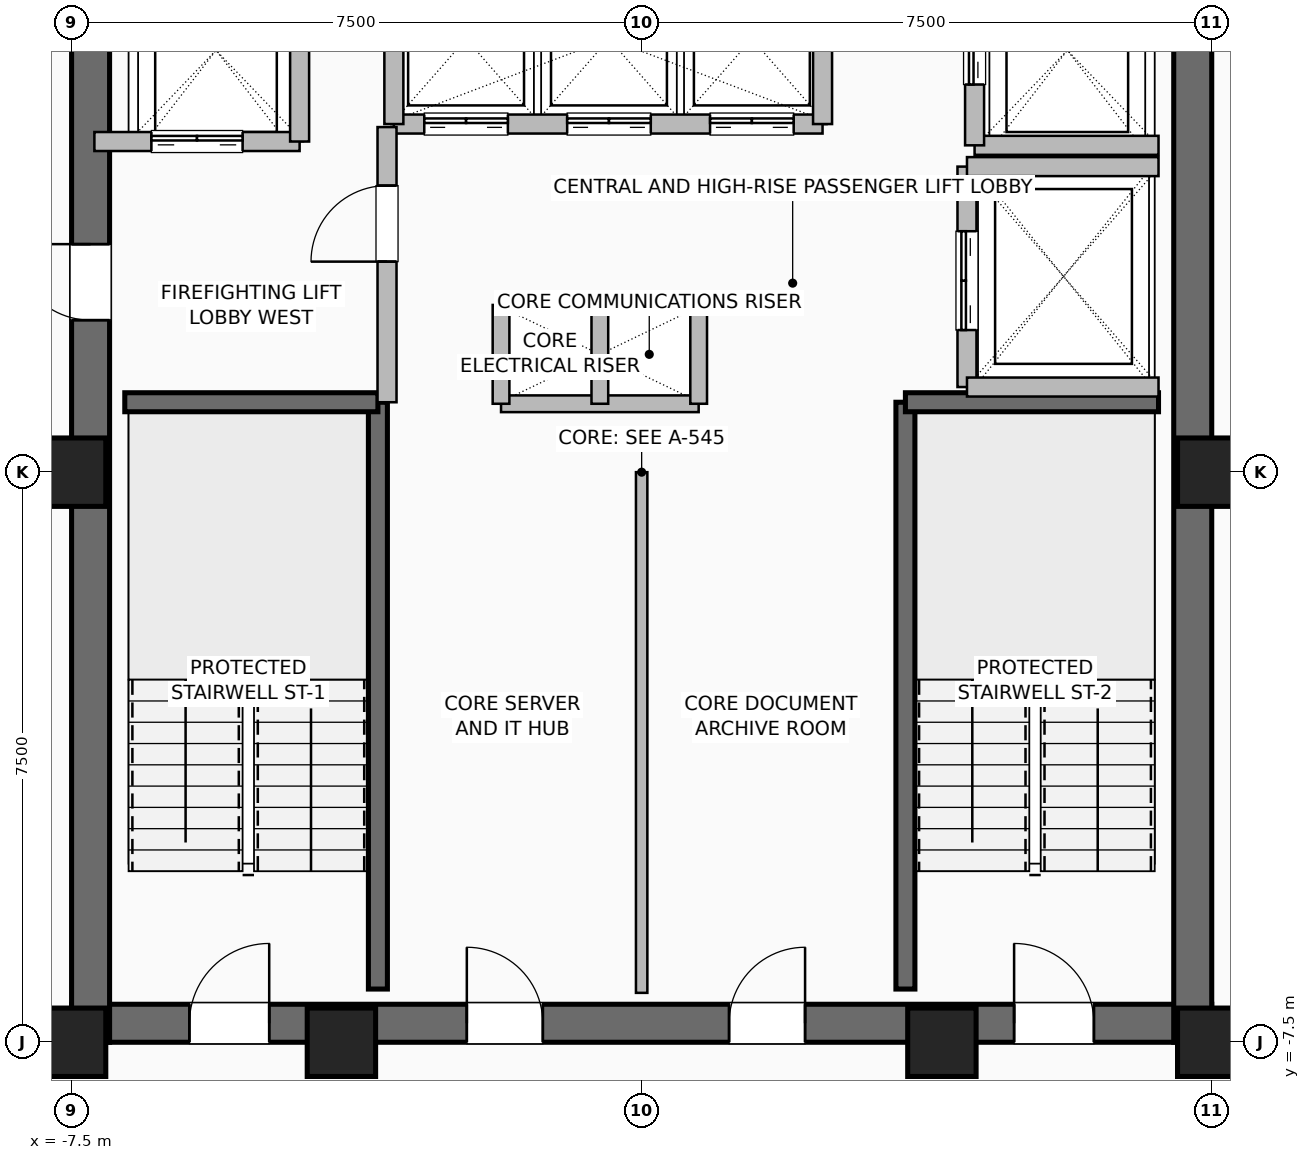
"""IFC4 building model, lengths in metres.
Left out: names, types, materials, properties, quantities, classifications, styles, units other than length and angle.
Written with IfcOpenShell. Run it as: python <this file> out.ifc"""

import sys

from ifc_helpers import new_model, si_unit, direction, frame, frame_2d, origin, origin_2d, place, context, subcontext, project, spatial, rectangle, hollow_rectangle, extrude, element, fill, save


model = new_model("IFC4")
c1 = context("Model", 3, precision=1e-05, world=origin(), true_north=direction((0.0, 1.0)))
c2 = subcontext(c1, "Body", "Model", "MODEL_VIEW")
j1 = project(units=[si_unit("LENGTHUNIT", "METRE"), si_unit("PLANEANGLEUNIT", "RADIAN")], contexts=[c1])
p1 = place(None, origin())
s1 = spatial("IfcSite", under=j1, at=p1, CompositionType="ELEMENT")
p2 = place(p1, origin())
s2 = spatial("IfcBuilding", under=s1, at=p2, CompositionType="ELEMENT")
p3 = place(p2, frame((0.0, 0.0, 173.4)))
s3 = spatial("IfcBuildingStorey", under=s2, at=p3, CompositionType="ELEMENT", Elevation=173.4)
for number, where, z_axis, x_axis in (
    (1, (-7.5, -7.5, 0.0), (0.0, 0.0, 1.0), (1.0, 0.0, 0.0)),
    (2, (-3.95, -7.5, 0.0), (0.0, 0.0, 1.0), (1.0, 0.0, 0.0)),
    (3, (3.95, -7.5, 0.0), (0.0, 0.0, 1.0), (1.0, 0.0, 0.0)),
    (4, (7.5, -7.5, 0.0), (0.0, 0.0, 1.0), (1.0, 0.0, 0.0)),
    (5, (7.5, 0.0, 0.0), (0.0, 0.0, 1.0), (1.0, 0.0, 0.0)),
    (6, (-7.5, 0.0, 0.0), (0.0, 0.0, 1.0), (1.0, 0.0, 0.0)),
):
    element("IfcColumn", number, at=place(p3, frame(where, z_axis=z_axis, x_axis=x_axis)), inside=s3, PredefinedType="COLUMN", context=c2, shape_type="SweptSolid", body=[
        extrude(hollow_rectangle(XDim=0.9, YDim=0.9, WallThickness=0.045, at=origin_2d()), origin(), (0.0, 0.0, 1.0), 3.6),
    ])
p4 = place(p3, frame((-7.5, -7.25, 0.0), z_axis=(0.0, 0.0, 1.0), x_axis=(1.0, 0.0, 0.0)))
e7 = element("IfcWall", 7, at=p4, inside=s3, PredefinedType="SHEAR", context=c2, shape_type="SweptSolid", body=[
    extrude(rectangle(XDim=15.0, YDim=0.5, at=frame_2d((7.5, 0.0))), origin(), (0.0, 0.0, 1.0), 3.36),
])
p5 = place(p4, frame((1.55, 0.0, 0.0)))
e8 = element("IfcOpeningElement", 8, at=p5, cuts=e7, PredefinedType="OPENING", context=c2, shape_type="SweptSolid", body=[
    extrude(rectangle(XDim=1.05, YDim=2.08, at=frame_2d((0.525, 1.04))), frame((0.0, 0.26, 0.0), z_axis=(0.0, -1.0, 0.0), x_axis=(1.0, 0.0, 0.0)), (0.0, 0.0, 1.0), 0.52),
])
p6 = place(p4, frame((12.4, 0.0, 0.0)))
e9 = element("IfcOpeningElement", 9, at=p6, cuts=e7, PredefinedType="OPENING", context=c2, shape_type="SweptSolid", body=[
    extrude(rectangle(XDim=1.05, YDim=2.08, at=frame_2d((0.525, 1.04))), frame((0.0, 0.26, 0.0), z_axis=(0.0, -1.0, 0.0), x_axis=(1.0, 0.0, 0.0)), (0.0, 0.0, 1.0), 0.52),
])
p7 = place(p4, frame((5.2, 0.0, 0.0)))
e10 = element("IfcOpeningElement", 10, at=p7, cuts=e7, PredefinedType="OPENING", context=c2, shape_type="SweptSolid", body=[
    extrude(rectangle(XDim=1.0, YDim=2.08, at=frame_2d((0.5, 1.04))), frame((0.0, 0.26, 0.0), z_axis=(0.0, -1.0, 0.0), x_axis=(1.0, 0.0, 0.0)), (0.0, 0.0, 1.0), 0.52),
])
p8 = place(p4, frame((8.65, 0.0, 0.0)))
e11 = element("IfcOpeningElement", 11, at=p8, cuts=e7, PredefinedType="OPENING", context=c2, shape_type="SweptSolid", body=[
    extrude(rectangle(XDim=1.0, YDim=2.08, at=frame_2d((0.5, 1.04))), frame((0.0, 0.26, 0.0), z_axis=(0.0, -1.0, 0.0), x_axis=(1.0, 0.0, 0.0)), (0.0, 0.0, 1.0), 0.52),
])
p9 = place(p3, frame((-7.25, -7.5, 0.0), z_axis=(0.0, 0.0, 1.0), x_axis=(0.0, 1.0, 0.0)))
e12 = element("IfcWall", 12, at=p9, inside=s3, PredefinedType="SHEAR", context=c2, shape_type="SweptSolid", body=[
    extrude(rectangle(XDim=15.0, YDim=0.5, at=frame_2d((7.5, 0.0))), origin(), (0.0, 0.0, 1.0), 3.36),
])
p10 = place(p9, frame((9.5, 0.0, 0.0)))
e13 = element("IfcOpeningElement", 13, at=p10, cuts=e12, PredefinedType="OPENING", context=c2, shape_type="SweptSolid", body=[
    extrude(rectangle(XDim=1.0, YDim=2.08, at=frame_2d((0.5, 1.04))), frame((0.0, 0.26, 0.0), z_axis=(0.0, -1.0, 0.0), x_axis=(1.0, 0.0, 0.0)), (0.0, 0.0, 1.0), 0.52),
])
p11 = place(p3, frame((7.25, -7.5, 0.0), z_axis=(0.0, 0.0, 1.0), x_axis=(0.0, 1.0, 0.0)))
e14 = element("IfcWall", 14, at=p11, inside=s3, PredefinedType="SHEAR", context=c2, shape_type="SweptSolid", body=[
    extrude(rectangle(XDim=15.0, YDim=0.5, at=frame_2d((7.5, 0.0))), origin(), (0.0, 0.0, 1.0), 3.36),
])
p12 = place(p3, frame((-3.47, -6.8, 0.0), z_axis=(0.0, 0.0, 1.0), x_axis=(0.0, 1.0, 0.0)))
e15 = element("IfcWall", 15, at=p12, inside=s3, PredefinedType="SHEAR", context=c2, shape_type="SweptSolid", body=[
    extrude(rectangle(XDim=7.72, YDim=0.25, at=frame_2d((3.86, 0.0))), origin(), (0.0, 0.0, 1.0), 3.36),
])
p13 = place(p3, frame((-6.8, 0.92, 0.0), z_axis=(0.0, 0.0, 1.0), x_axis=(1.0, 0.0, 0.0)))
e16 = element("IfcWall", 16, at=p13, inside=s3, PredefinedType="SHEAR", context=c2, shape_type="SweptSolid", body=[
    extrude(rectangle(XDim=3.33, YDim=0.25, at=frame_2d((1.665, 0.0))), origin(), (0.0, 0.0, 1.0), 3.36),
])
p14 = place(p3, frame((3.47, -6.8, 0.0), z_axis=(0.0, 0.0, 1.0), x_axis=(0.0, 1.0, 0.0)))
e17 = element("IfcWall", 17, at=p14, inside=s3, PredefinedType="SHEAR", context=c2, shape_type="SweptSolid", body=[
    extrude(rectangle(XDim=7.72, YDim=0.25, at=frame_2d((3.86, 0.0))), origin(), (0.0, 0.0, 1.0), 3.36),
])
p15 = place(p3, frame((3.47, 0.92, 0.0), z_axis=(0.0, 0.0, 1.0), x_axis=(1.0, 0.0, 0.0)))
e18 = element("IfcWall", 18, at=p15, inside=s3, PredefinedType="SHEAR", context=c2, shape_type="SweptSolid", body=[
    extrude(rectangle(XDim=3.33, YDim=0.25, at=frame_2d((1.665, 0.0))), origin(), (0.0, 0.0, 1.0), 3.36),
])
for number, where, z_axis, x_axis in (
    (19, (-1.85, 2.2, 0.0), (0.0, 0.0, 1.0), (1.0, 0.0, 0.0)),
    (20, (-1.85, 0.9, 0.0), (0.0, 0.0, 1.0), (1.0, 0.0, 0.0)),
):
    element("IfcWall", number, at=place(p3, frame(where, z_axis=z_axis, x_axis=x_axis)), inside=s3, PredefinedType="PARTITIONING", context=c2, shape_type="SweptSolid", body=[
        extrude(rectangle(XDim=2.6, YDim=0.22, at=frame_2d((1.3, 0.0))), origin(), (0.0, 0.0, 1.0), 3.36),
    ])
for number, where, z_axis, x_axis in (
    (21, (-0.55, 0.9, 0.0), (0.0, 0.0, 1.0), (0.0, 1.0, 0.0)),
    (22, (0.75, 0.9, 0.0), (0.0, 0.0, 1.0), (0.0, 1.0, 0.0)),
    (23, (-1.85, 0.9, 0.0), (0.0, 0.0, 1.0), (0.0, 1.0, 0.0)),
):
    element("IfcWall", number, at=place(p3, frame(where, z_axis=z_axis, x_axis=x_axis)), inside=s3, PredefinedType="PARTITIONING", context=c2, shape_type="SweptSolid", body=[
        extrude(rectangle(XDim=1.3, YDim=0.22, at=frame_2d((0.65, 0.0))), origin(), (0.0, 0.0, 1.0), 3.36),
    ])
p16 = place(p3, frame((-3.26, 4.58, 0.0), z_axis=(0.0, 0.0, 1.0), x_axis=(1.0, 0.0, 0.0)))
e24 = element("IfcWall", 24, at=p16, inside=s3, PredefinedType="SHEAR", context=c2, shape_type="SweptSolid", body=[
    extrude(rectangle(XDim=5.64, YDim=0.25, at=frame_2d((2.82, 0.0))), origin(), (0.0, 0.0, 1.0), 3.36),
])
p17 = place(p16, frame((0.4, 0.0, 0.0)))
e25 = element("IfcOpeningElement", 25, at=p17, cuts=e24, PredefinedType="OPENING", context=c2, shape_type="SweptSolid", body=[
    extrude(rectangle(XDim=1.1, YDim=2.2, at=frame_2d((0.55, 1.1))), frame((0.0, 0.135, 0.0), z_axis=(0.0, -1.0, 0.0), x_axis=(1.0, 0.0, 0.0)), (0.0, 0.0, 1.0), 0.27),
])
p18 = place(p16, frame((2.28, 0.0, 0.0)))
e26 = element("IfcOpeningElement", 26, at=p18, cuts=e24, PredefinedType="OPENING", context=c2, shape_type="SweptSolid", body=[
    extrude(rectangle(XDim=1.1, YDim=2.2, at=frame_2d((0.55, 1.1))), frame((0.0, 0.135, 0.0), z_axis=(0.0, -1.0, 0.0), x_axis=(1.0, 0.0, 0.0)), (0.0, 0.0, 1.0), 0.27),
])
p19 = place(p16, frame((4.16, 0.0, 0.0)))
e27 = element("IfcOpeningElement", 27, at=p19, cuts=e24, PredefinedType="OPENING", context=c2, shape_type="SweptSolid", body=[
    extrude(rectangle(XDim=1.1, YDim=2.2, at=frame_2d((0.55, 1.1))), frame((0.0, 0.135, 0.0), z_axis=(0.0, -1.0, 0.0), x_axis=(1.0, 0.0, 0.0)), (0.0, 0.0, 1.0), 0.27),
])
for number, where, z_axis, x_axis in (
    (28, (-3.26, 4.58, 0.0), (0.0, 0.0, 1.0), (0.0, 1.0, 0.0)),
    (29, (2.38, 4.58, 0.0), (0.0, 0.0, 1.0), (0.0, 1.0, 0.0)),
):
    element("IfcWall", number, at=place(p3, frame(where, z_axis=z_axis, x_axis=x_axis)), inside=s3, PredefinedType="SHEAR", context=c2, shape_type="SweptSolid", body=[
        extrude(rectangle(XDim=2.22, YDim=0.25, at=frame_2d((1.11, 0.0))), origin(), (0.0, 0.0, 1.0), 3.36),
    ])
p20 = place(p3, frame((-7.2, 4.35, 0.0), z_axis=(0.0, 0.0, 1.0), x_axis=(1.0, 0.0, 0.0)))
e30 = element("IfcWall", 30, at=p20, inside=s3, PredefinedType="SHEAR", context=c2, shape_type="SweptSolid", body=[
    extrude(rectangle(XDim=2.7, YDim=0.25, at=frame_2d((1.35, 0.0))), origin(), (0.0, 0.0, 1.0), 3.36),
])
p21 = place(p20, frame((0.75, 0.0, 0.0)))
e31 = element("IfcOpeningElement", 31, at=p21, cuts=e30, PredefinedType="OPENING", context=c2, shape_type="SweptSolid", body=[
    extrude(rectangle(XDim=1.2, YDim=2.2, at=frame_2d((0.6, 1.1))), frame((0.0, 0.135, 0.0), z_axis=(0.0, -1.0, 0.0), x_axis=(1.0, 0.0, 0.0)), (0.0, 0.0, 1.0), 0.27),
])
p22 = place(p3, frame((-4.5, 4.35, 0.0), z_axis=(0.0, 0.0, 1.0), x_axis=(0.0, 1.0, 0.0)))
e32 = element("IfcWall", 32, at=p22, inside=s3, PredefinedType="SHEAR", context=c2, shape_type="SweptSolid", body=[
    extrude(rectangle(XDim=2.85, YDim=0.25, at=frame_2d((1.425, 0.0))), origin(), (0.0, 0.0, 1.0), 3.36),
])
p23 = place(p3, frame((4.38, 4.3, 0.0), z_axis=(0.0, 0.0, 1.0), x_axis=(1.0, 0.0, 0.0)))
e33 = element("IfcWall", 33, at=p23, inside=s3, PredefinedType="SHEAR", context=c2, shape_type="SweptSolid", body=[
    extrude(rectangle(XDim=2.42, YDim=0.25, at=frame_2d((1.21, 0.0))), origin(), (0.0, 0.0, 1.0), 3.36),
])
p24 = place(p3, frame((4.38, 4.3, 0.0), z_axis=(0.0, 0.0, 1.0), x_axis=(0.0, 1.0, 0.0)))
e34 = element("IfcWall", 34, at=p24, inside=s3, PredefinedType="SHEAR", context=c2, shape_type="SweptSolid", body=[
    extrude(rectangle(XDim=2.5, YDim=0.25, at=frame_2d((1.25, 0.0))), origin(), (0.0, 0.0, 1.0), 3.36),
])
p25 = place(p24, frame((0.8, 0.0, 0.0)))
e35 = element("IfcOpeningElement", 35, at=p25, cuts=e34, PredefinedType="OPENING", context=c2, shape_type="SweptSolid", body=[
    extrude(rectangle(XDim=1.2, YDim=2.2, at=frame_2d((0.6, 1.1))), frame((0.0, 0.135, 0.0), z_axis=(0.0, -1.0, 0.0), x_axis=(1.0, 0.0, 0.0)), (0.0, 0.0, 1.0), 0.27),
])
p26 = place(p3, frame((4.28, 1.12, 0.0), z_axis=(0.0, 0.0, 1.0), x_axis=(0.0, 1.0, 0.0)))
e36 = element("IfcWall", 36, at=p26, inside=s3, PredefinedType="SHEAR", context=c2, shape_type="SweptSolid", body=[
    extrude(rectangle(XDim=2.9, YDim=0.25, at=frame_2d((1.45, 0.0))), origin(), (0.0, 0.0, 1.0), 3.36),
])
p27 = place(p26, frame((0.75, 0.0, 0.0)))
e37 = element("IfcOpeningElement", 37, at=p27, cuts=e36, PredefinedType="OPENING", context=c2, shape_type="SweptSolid", body=[
    extrude(rectangle(XDim=1.3, YDim=2.3, at=frame_2d((0.65, 1.15))), frame((0.0, 0.135, 0.0), z_axis=(0.0, -1.0, 0.0), x_axis=(1.0, 0.0, 0.0)), (0.0, 0.0, 1.0), 0.27),
])
for number, where, z_axis, x_axis in (
    (38, (4.28, 1.12, 0.0), (0.0, 0.0, 1.0), (1.0, 0.0, 0.0)),
    (39, (4.28, 4.02, 0.0), (0.0, 0.0, 1.0), (1.0, 0.0, 0.0)),
):
    element("IfcWall", number, at=place(p3, frame(where, z_axis=z_axis, x_axis=x_axis)), inside=s3, PredefinedType="SHEAR", context=c2, shape_type="SweptSolid", body=[
        extrude(rectangle(XDim=2.52, YDim=0.25, at=frame_2d((1.26, 0.0))), origin(), (0.0, 0.0, 1.0), 3.36),
    ])
p28 = place(p3, frame((-3.35, 0.92, 0.0), z_axis=(0.0, 0.0, 1.0), x_axis=(0.0, 1.0, 0.0)))
e40 = element("IfcWall", 40, at=p28, inside=s3, PredefinedType="SHEAR", context=c2, shape_type="SweptSolid", body=[
    extrude(rectangle(XDim=3.62, YDim=0.25, at=frame_2d((1.81, 0.0))), origin(), (0.0, 0.0, 1.0), 3.36),
])
p29 = place(p28, frame((1.85, 0.0, 0.0)))
e41 = element("IfcOpeningElement", 41, at=p29, cuts=e40, PredefinedType="OPENING", context=c2, shape_type="SweptSolid", body=[
    extrude(rectangle(XDim=1.0, YDim=2.08, at=frame_2d((0.5, 1.04))), frame((0.0, 0.135, 0.0), z_axis=(0.0, -1.0, 0.0), x_axis=(1.0, 0.0, 0.0)), (0.0, 0.0, 1.0), 0.27),
])
p30 = place(p3, frame((0.0, -6.85, 0.0), z_axis=(0.0, 0.0, 1.0), x_axis=(0.0, 1.0, 0.0)))
e42 = element("IfcWall", 42, at=p30, inside=s3, PredefinedType="PARTITIONING", context=c2, shape_type="SweptSolid", body=[
    extrude(rectangle(XDim=6.85, YDim=0.15, at=frame_2d((3.425, 0.0))), origin(), (0.0, 0.0, 1.0), 3.36),
])
p31 = place(p3, frame((7.45, -7.48, 0.0), z_axis=(0.0, 0.0, 1.0), x_axis=(1.0, 0.0, 0.0)))
e43 = element("IfcWall", 43, at=p31, inside=s3, PredefinedType="PARTITIONING", context=c2, shape_type="SweptSolid", body=[
    extrude(rectangle(XDim=0.95, YDim=0.15, at=frame_2d((0.475, 0.0))), origin(), (0.0, 0.0, 1.0), 3.36),
])
p32 = place(p5, origin())
e44 = element("IfcDoor", 44, at=p32, inside=s3, OperationType="SINGLE_SWING_RIGHT", PredefinedType="DOOR", context=c2, shape_type="SweptSolid", body=[
    extrude(rectangle(XDim=1.05, YDim=2.08, at=frame_2d((0.525, 1.04))), frame((0.0, 0.025, 0.0), z_axis=(0.0, -1.0, 0.0), x_axis=(1.0, 0.0, 0.0)), (0.0, 0.0, 1.0), 0.05),
])
fill(e8, e44)
p33 = place(p6, origin())
e45 = element("IfcDoor", 45, at=p33, inside=s3, OperationType="SINGLE_SWING_LEFT", PredefinedType="DOOR", context=c2, shape_type="SweptSolid", body=[
    extrude(rectangle(XDim=1.05, YDim=2.08, at=frame_2d((0.525, 1.04))), frame((0.0, 0.025, 0.0), z_axis=(0.0, -1.0, 0.0), x_axis=(1.0, 0.0, 0.0)), (0.0, 0.0, 1.0), 0.05),
])
fill(e9, e45)
p34 = place(p10, origin())
e46 = element("IfcDoor", 46, at=p34, inside=s3, OperationType="SINGLE_SWING_RIGHT", PredefinedType="DOOR", context=c2, shape_type="SweptSolid", body=[
    extrude(rectangle(XDim=1.0, YDim=2.08, at=frame_2d((0.5, 1.04))), frame((0.0, 0.025, 0.0), z_axis=(0.0, -1.0, 0.0), x_axis=(1.0, 0.0, 0.0)), (0.0, 0.0, 1.0), 0.05),
])
fill(e13, e46)
p35 = place(p7, origin())
e47 = element("IfcDoor", 47, at=p35, inside=s3, OperationType="SINGLE_SWING_LEFT", PredefinedType="DOOR", context=c2, shape_type="SweptSolid", body=[
    extrude(rectangle(XDim=1.0, YDim=2.08, at=frame_2d((0.5, 1.04))), frame((0.0, 0.025, 0.0), z_axis=(0.0, -1.0, 0.0), x_axis=(1.0, 0.0, 0.0)), (0.0, 0.0, 1.0), 0.05),
])
fill(e10, e47)
p36 = place(p8, origin())
e48 = element("IfcDoor", 48, at=p36, inside=s3, OperationType="SINGLE_SWING_RIGHT", PredefinedType="DOOR", context=c2, shape_type="SweptSolid", body=[
    extrude(rectangle(XDim=1.0, YDim=2.08, at=frame_2d((0.5, 1.04))), frame((0.0, 0.025, 0.0), z_axis=(0.0, -1.0, 0.0), x_axis=(1.0, 0.0, 0.0)), (0.0, 0.0, 1.0), 0.05),
])
fill(e11, e48)
p37 = place(p17, origin())
e49 = element("IfcDoor", 49, at=p37, inside=s3, OperationType="DOUBLE_DOOR_SLIDING", PredefinedType="DOOR", context=c2, shape_type="SweptSolid", body=[
    extrude(rectangle(XDim=1.1, YDim=2.2, at=frame_2d((0.55, 1.1))), frame((0.0, 0.025, 0.0), z_axis=(0.0, -1.0, 0.0), x_axis=(1.0, 0.0, 0.0)), (0.0, 0.0, 1.0), 0.05),
])
fill(e25, e49)
p38 = place(p18, origin())
e50 = element("IfcDoor", 50, at=p38, inside=s3, OperationType="DOUBLE_DOOR_SLIDING", PredefinedType="DOOR", context=c2, shape_type="SweptSolid", body=[
    extrude(rectangle(XDim=1.1, YDim=2.2, at=frame_2d((0.55, 1.1))), frame((0.0, 0.025, 0.0), z_axis=(0.0, -1.0, 0.0), x_axis=(1.0, 0.0, 0.0)), (0.0, 0.0, 1.0), 0.05),
])
fill(e26, e50)
p39 = place(p19, origin())
e51 = element("IfcDoor", 51, at=p39, inside=s3, OperationType="DOUBLE_DOOR_SLIDING", PredefinedType="DOOR", context=c2, shape_type="SweptSolid", body=[
    extrude(rectangle(XDim=1.1, YDim=2.2, at=frame_2d((0.55, 1.1))), frame((0.0, 0.025, 0.0), z_axis=(0.0, -1.0, 0.0), x_axis=(1.0, 0.0, 0.0)), (0.0, 0.0, 1.0), 0.05),
])
fill(e27, e51)
p40 = place(p21, origin())
e52 = element("IfcDoor", 52, at=p40, inside=s3, OperationType="DOUBLE_DOOR_SLIDING", PredefinedType="DOOR", context=c2, shape_type="SweptSolid", body=[
    extrude(rectangle(XDim=1.2, YDim=2.2, at=frame_2d((0.6, 1.1))), frame((0.0, 0.025, 0.0), z_axis=(0.0, -1.0, 0.0), x_axis=(1.0, 0.0, 0.0)), (0.0, 0.0, 1.0), 0.05),
])
fill(e31, e52)
p41 = place(p25, origin())
e53 = element("IfcDoor", 53, at=p41, inside=s3, OperationType="DOUBLE_DOOR_SLIDING", PredefinedType="DOOR", context=c2, shape_type="SweptSolid", body=[
    extrude(rectangle(XDim=1.2, YDim=2.2, at=frame_2d((0.6, 1.1))), frame((0.0, 0.025, 0.0), z_axis=(0.0, -1.0, 0.0), x_axis=(1.0, 0.0, 0.0)), (0.0, 0.0, 1.0), 0.05),
])
fill(e35, e53)
p42 = place(p27, origin())
e54 = element("IfcDoor", 54, at=p42, inside=s3, OperationType="DOUBLE_DOOR_SLIDING", PredefinedType="DOOR", context=c2, shape_type="SweptSolid", body=[
    extrude(rectangle(XDim=1.3, YDim=2.3, at=frame_2d((0.65, 1.15))), frame((0.0, 0.025, 0.0), z_axis=(0.0, -1.0, 0.0), x_axis=(1.0, 0.0, 0.0)), (0.0, 0.0, 1.0), 0.05),
])
fill(e37, e54)
p43 = place(p29, origin())
e55 = element("IfcDoor", 55, at=p43, inside=s3, OperationType="SINGLE_SWING_LEFT", PredefinedType="DOOR", context=c2, shape_type="SweptSolid", body=[
    extrude(rectangle(XDim=1.0, YDim=2.08, at=frame_2d((0.5, 1.04))), frame((0.0, 0.025, 0.0), z_axis=(0.0, -1.0, 0.0), x_axis=(1.0, 0.0, 0.0)), (0.0, 0.0, 1.0), 0.05),
])
fill(e41, e55)
save(model, sys.argv[1])
